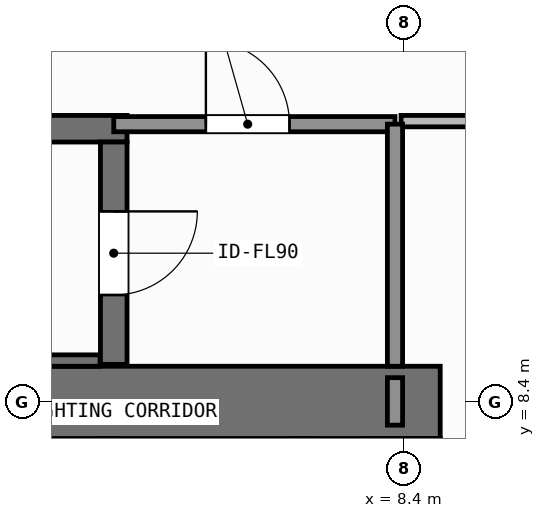
"""IFC4 building model, lengths in metres.
Left out: names, types, materials, properties, quantities, classifications, styles, units other than length and angle.
Written with IfcOpenShell. Run it as: python <this file> out.ifc"""

import sys

from ifc_helpers import new_model, si_unit, direction, frame, frame_2d, origin, place, context, subcontext, project, spatial, rectangle, extrude, element, fill, save


model = new_model("IFC4")
c1 = context("Model", 3, precision=1e-05, world=origin(), true_north=direction((0.0, 1.0)))
c2 = subcontext(c1, "Body", "Model", "MODEL_VIEW")
j1 = project(units=[si_unit("LENGTHUNIT", "METRE"), si_unit("PLANEANGLEUNIT", "RADIAN")], contexts=[c1])
p1 = place(None, origin())
s1 = spatial("IfcSite", under=j1, at=p1, CompositionType="ELEMENT")
p2 = place(p1, origin())
s2 = spatial("IfcBuilding", under=s1, at=p2, CompositionType="ELEMENT")
p3 = place(p2, frame((0.0, 0.0, 89.1)))
s3 = spatial("IfcBuildingStorey", under=s2, at=p3, CompositionType="ELEMENT", Elevation=89.1)
p4 = place(p3, frame((-7.55, 8.4, 0.0), z_axis=(0.0, 0.0, 1.0), x_axis=(1.0, 0.0, 0.0)))
e1 = element("IfcWall", 1, at=p4, inside=s3, PredefinedType="SHEAR", context=c2, shape_type="SweptSolid", body=[
    extrude(rectangle(XDim=16.425, YDim=0.95, at=frame_2d((8.212, 0.0))), origin(), (0.0, 0.0, 1.0), 3.9),
])
p5 = place(p3, frame((8.4, 5.825, 0.0), z_axis=(0.0, 0.0, 1.0), x_axis=(0.0, 1.0, 0.0)))
e2 = element("IfcWall", 2, at=p5, inside=s3, PredefinedType="SHEAR", context=c2, shape_type="SweptSolid", body=[
    extrude(rectangle(XDim=2.1, YDim=0.95, at=frame_2d((1.05, 0.0))), origin(), (0.0, 0.0, 1.0), 3.9),
])
p6 = place(p3, frame((-2.555, 12.0, 0.0), z_axis=(0.0, 0.0, 1.0), x_axis=(1.0, 0.0, 0.0)))
e3 = element("IfcWall", 3, at=p6, inside=s3, PredefinedType="SHEAR", context=c2, shape_type="SweptSolid", body=[
    extrude(rectangle(XDim=7.31, YDim=0.35, at=frame_2d((3.655, 0.0))), origin(), (0.0, 0.0, 1.0), 3.9),
])
p7 = place(p3, frame((-2.2, 8.95, 0.0), z_axis=(0.0, 0.0, 1.0), x_axis=(1.0, 0.0, 0.0)))
e4 = element("IfcWall", 4, at=p7, inside=s3, PredefinedType="SHEAR", context=c2, shape_type="SweptSolid", body=[
    extrude(rectangle(XDim=6.6, YDim=0.15, at=frame_2d((3.3, 0.0))), origin(), (0.0, 0.0, 1.0), 3.9),
])
p8 = place(p3, frame((4.58, 11.825, 0.0), z_axis=(0.0, 0.0, 1.0), x_axis=(0.0, -1.0, 0.0)))
e5 = element("IfcWall", 5, at=p8, inside=s3, PredefinedType="SHEAR", context=c2, shape_type="SweptSolid", body=[
    extrude(rectangle(XDim=2.925, YDim=0.35, at=frame_2d((1.462, 0.0))), origin(), (0.0, 0.0, 1.0), 3.9),
])
p9 = place(p8, frame((0.913, 0.0, 0.0)))
e6 = element("IfcOpeningElement", 6, at=p9, cuts=e5, PredefinedType="OPENING", context=c2, shape_type="SweptSolid", body=[
    extrude(rectangle(XDim=1.1, YDim=2.15, at=frame_2d((0.55, 1.075))), frame((0.0, 0.185, 0.0), z_axis=(0.0, -1.0, 0.0), x_axis=(1.0, 0.0, 0.0)), (0.0, 0.0, 1.0), 0.37),
])
p10 = place(p3, frame((4.525, 5.825, 0.0), z_axis=(0.0, 0.0, 1.0), x_axis=(0.0, 1.0, 0.0)))
e7 = element("IfcWall", 7, at=p10, inside=s3, PredefinedType="SHEAR", context=c2, shape_type="SweptSolid", body=[
    extrude(rectangle(XDim=2.1, YDim=0.2, at=frame_2d((1.05, 0.0))), origin(), (0.0, 0.0, 1.0), 3.68),
])
p11 = place(p10, frame((0.425, 0.0, 0.0)))
e8 = element("IfcOpeningElement", 8, at=p11, cuts=e7, PredefinedType="OPENING", context=c2, shape_type="SweptSolid", body=[
    extrude(rectangle(XDim=1.1, YDim=2.2, at=frame_2d((0.55, 1.1))), frame((0.0, 0.11, 0.0), z_axis=(0.0, -1.0, 0.0), x_axis=(1.0, 0.0, 0.0)), (0.0, 0.0, 1.0), 0.22),
])
p12 = place(p3, frame((7.075, 5.825, 0.0), z_axis=(0.0, 0.0, 1.0), x_axis=(0.0, 1.0, 0.0)))
e9 = element("IfcWall", 9, at=p12, inside=s3, PredefinedType="SHEAR", context=c2, shape_type="SweptSolid", body=[
    extrude(rectangle(XDim=2.1, YDim=0.2, at=frame_2d((1.05, 0.0))), origin(), (0.0, 0.0, 1.0), 3.68),
])
p13 = place(p3, frame((4.58, 12.06, 0.0), z_axis=(0.0, 0.0, 1.0), x_axis=(1.0, 0.0, 0.0)))
e10 = element("IfcWall", 10, at=p13, inside=s3, PredefinedType="SOLIDWALL", context=c2, shape_type="SweptSolid", body=[
    extrude(rectangle(XDim=3.7, YDim=0.2, at=frame_2d((1.85, 0.0))), origin(), (0.0, 0.0, 1.0), 3.68),
])
p14 = place(p13, frame((1.212, 0.0, 0.0)))
e11 = element("IfcOpeningElement", 11, at=p14, cuts=e10, PredefinedType="OPENING", context=c2, shape_type="SweptSolid", body=[
    extrude(rectangle(XDim=1.1, YDim=2.15, at=frame_2d((0.55, 1.075))), frame((0.0, 0.11, 0.0), z_axis=(0.0, -1.0, 0.0), x_axis=(1.0, 0.0, 0.0)), (0.0, 0.0, 1.0), 0.22),
])
p15 = place(p3, frame((8.36, 12.1, 0.0), z_axis=(0.0, 0.0, 1.0), x_axis=(1.0, 0.0, 0.0)))
e12 = element("IfcWall", 12, at=p15, inside=s3, PredefinedType="PARTITIONING", context=c2, shape_type="SweptSolid", body=[
    extrude(rectangle(XDim=7.22, YDim=0.15, at=frame_2d((3.61, 0.0))), origin(), (0.0, 0.0, 1.0), 3.68),
])
p16 = place(p15, frame((3.513, 0.0, 0.0)))
e13 = element("IfcOpeningElement", 13, at=p16, cuts=e12, PredefinedType="OPENING", context=c2, shape_type="SweptSolid", body=[
    extrude(rectangle(XDim=0.9, YDim=2.1, at=frame_2d((0.45, 1.05))), frame((0.0, 0.085, 0.0), z_axis=(0.0, -1.0, 0.0), x_axis=(1.0, 0.0, 0.0)), (0.0, 0.0, 1.0), 0.17),
])
p17 = place(p3, frame((8.28, 8.875, 0.0), z_axis=(0.0, 0.0, 1.0), x_axis=(0.0, 1.0, 0.0)))
e14 = element("IfcWall", 14, at=p17, inside=s3, PredefinedType="SOLIDWALL", context=c2, shape_type="SweptSolid", body=[
    extrude(rectangle(XDim=3.185, YDim=0.2, at=frame_2d((1.593, 0.0))), origin(), (0.0, 0.0, 1.0), 3.68),
])
p18 = place(p3, frame((8.28, 8.1, 0.0), z_axis=(0.0, 0.0, 1.0), x_axis=(0.0, 1.0, 0.0)))
e15 = element("IfcWall", 15, at=p18, inside=s3, PredefinedType="SOLIDWALL", context=c2, shape_type="SweptSolid", body=[
    extrude(rectangle(XDim=0.625, YDim=0.2, at=frame_2d((0.312, 0.0))), origin(), (0.0, 0.0, 1.0), 3.68),
])
p19 = place(p9, origin())
e16 = element("IfcDoor", 16, at=p19, inside=s3, OperationType="SINGLE_SWING_LEFT", PredefinedType="DOOR", context=c2, shape_type="SweptSolid", body=[
    extrude(rectangle(XDim=1.1, YDim=2.15, at=frame_2d((0.55, 1.075))), frame((0.0, 0.025, 0.0), z_axis=(0.0, -1.0, 0.0), x_axis=(1.0, 0.0, 0.0)), (0.0, 0.0, 1.0), 0.05),
])
fill(e6, e16)
p20 = place(p14, origin())
e17 = element("IfcDoor", 17, at=p20, inside=s3, OperationType="SINGLE_SWING_LEFT", PredefinedType="DOOR", context=c2, shape_type="SweptSolid", body=[
    extrude(rectangle(XDim=1.1, YDim=2.15, at=frame_2d((0.55, 1.075))), frame((0.0, 0.025, 0.0), z_axis=(0.0, -1.0, 0.0), x_axis=(1.0, 0.0, 0.0)), (0.0, 0.0, 1.0), 0.05),
])
fill(e11, e17)
save(model, sys.argv[1])
